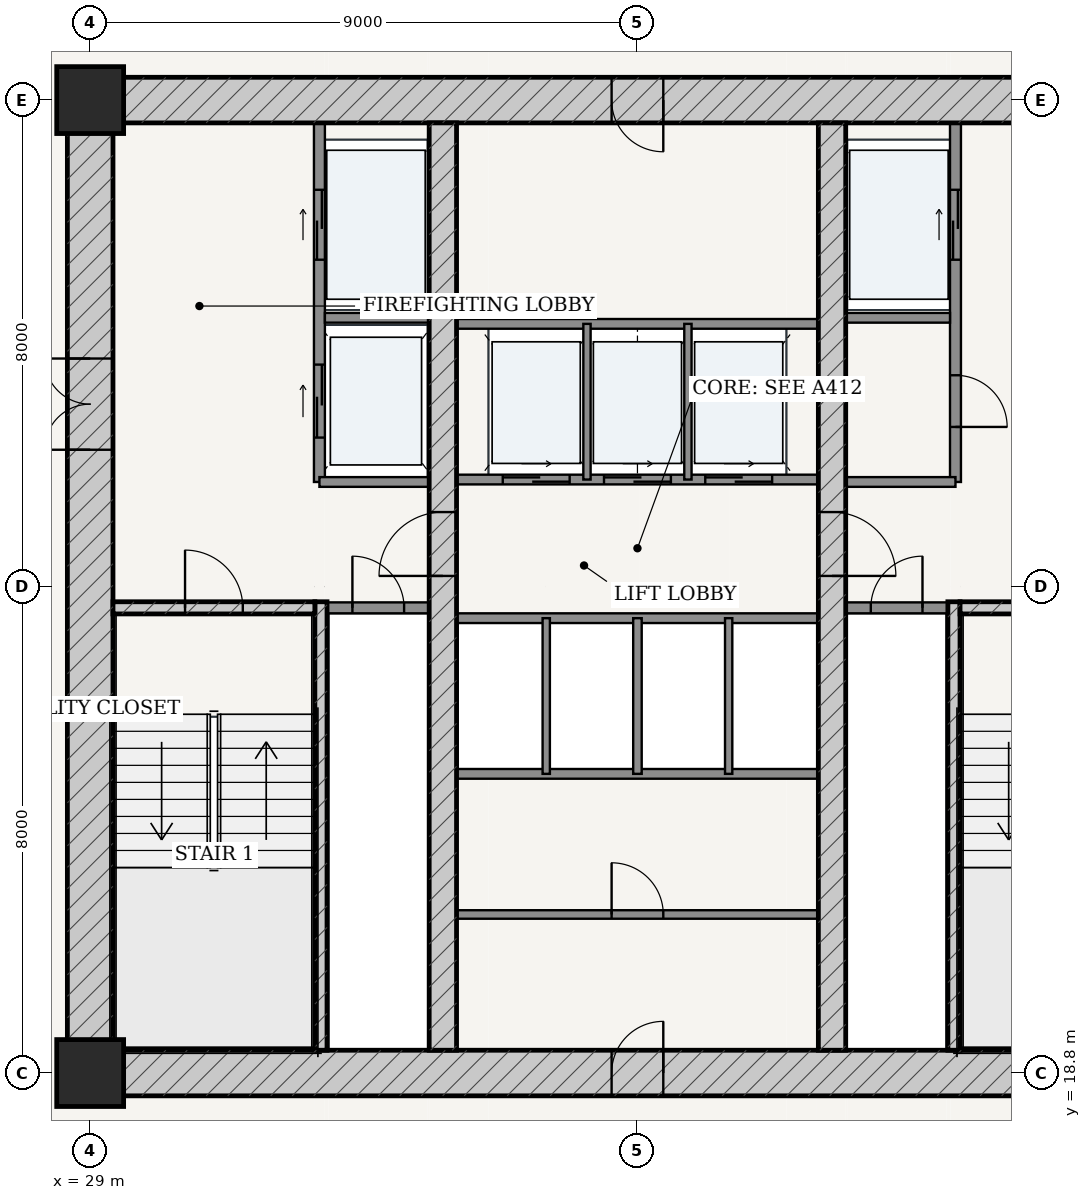
"""IFC4 building model, lengths in metres.
Left out: names, types, materials, properties, quantities, classifications, styles, units other than length and angle.
Written with IfcOpenShell. Run it as: python <this file> out.ifc"""

import sys

from ifc_helpers import new_model, si_unit, direction, frame, frame_2d, origin, origin_2d, place, context, subcontext, project, spatial, rectangle, extrude, source, transform, mapped, element, fill, save


model = new_model("IFC4")
c1 = context("Model", 3, precision=1e-05, world=origin(), true_north=direction((-0.2419218956, 0.970295726276)))
c2 = subcontext(c1, "Body", "Model", "MODEL_VIEW")
j1 = project(units=[si_unit("LENGTHUNIT", "METRE"), si_unit("PLANEANGLEUNIT", "RADIAN")], contexts=[c1])
p1 = place(None, origin())
s1 = spatial("IfcSite", under=j1, at=p1, CompositionType="ELEMENT")
p2 = place(p1, origin())
s2 = spatial("IfcBuilding", under=s1, at=p2, CompositionType="ELEMENT")
p3 = place(p2, frame((0.0, 0.0, 63.6)))
s3 = spatial("IfcBuildingStorey", under=s2, at=p3, CompositionType="ELEMENT", Elevation=63.6)
for number, where, z_axis, x_axis in (
    (1, (29.0, 18.8, 0.0), (0.0, 0.0, 1.0), (1.0, 0.0, 0.0)),
    (2, (29.0, 34.8, 0.0), (0.0, 0.0, 1.0), (1.0, 0.0, 0.0)),
):
    element("IfcColumn", number, at=place(p3, frame(where, z_axis=z_axis, x_axis=x_axis)), inside=s3, PredefinedType="COLUMN", context=c2, shape_type="SweptSolid", body=[
        extrude(rectangle(XDim=1.1, YDim=1.1, at=origin_2d()), origin(), (0.0, 0.0, 1.0), 3.6),
    ])
p4 = place(p3, frame((28.625, 18.8, 0.0), z_axis=(0.0, 0.0, 1.0), x_axis=(1.0, 0.0, 0.0)))
e3 = element("IfcWall", 3, at=p4, inside=s3, PredefinedType="SHEAR", context=c2, shape_type="SweptSolid", body=[
    extrude(rectangle(XDim=18.75, YDim=0.75, at=frame_2d((9.375, 0.0))), origin(), (0.0, 0.0, 1.0), 3.32),
])
p5 = place(p4, frame((8.95, 0.0, 0.0)))
e4 = element("IfcOpeningElement", 4, at=p5, cuts=e3, PredefinedType="OPENING", context=c2, shape_type="SweptSolid", body=[
    extrude(rectangle(XDim=0.85, YDim=2.1, at=frame_2d((0.425, 1.05))), frame((0.0, 0.385, 0.0), z_axis=(0.0, -1.0, 0.0), x_axis=(1.0, 0.0, 0.0)), (0.0, 0.0, 1.0), 0.77),
])
p6 = place(p3, frame((28.625, 34.8, 0.0), z_axis=(0.0, 0.0, 1.0), x_axis=(1.0, 0.0, 0.0)))
e5 = element("IfcWall", 5, at=p6, inside=s3, PredefinedType="SHEAR", context=c2, shape_type="SweptSolid", body=[
    extrude(rectangle(XDim=18.75, YDim=0.75, at=frame_2d((9.375, 0.0))), origin(), (0.0, 0.0, 1.0), 3.32),
])
p7 = place(p6, frame((8.95, 0.0, 0.0)))
e6 = element("IfcOpeningElement", 6, at=p7, cuts=e5, PredefinedType="OPENING", context=c2, shape_type="SweptSolid", body=[
    extrude(rectangle(XDim=0.85, YDim=2.1, at=frame_2d((0.425, 1.05))), frame((0.0, 0.385, 0.0), z_axis=(0.0, -1.0, 0.0), x_axis=(1.0, 0.0, 0.0)), (0.0, 0.0, 1.0), 0.77),
])
p8 = place(p3, frame((29.0, 19.175, 0.0), z_axis=(0.0, 0.0, 1.0), x_axis=(0.0, 1.0, 0.0)))
e7 = element("IfcWall", 7, at=p8, inside=s3, PredefinedType="SHEAR", context=c2, shape_type="SweptSolid", body=[
    extrude(rectangle(XDim=15.25, YDim=0.75, at=frame_2d((7.625, 0.0))), origin(), (0.0, 0.0, 1.0), 3.32),
])
p9 = place(p8, frame((9.875, 0.0, 0.0)))
e8 = element("IfcOpeningElement", 8, at=p9, cuts=e7, PredefinedType="OPENING", context=c2, shape_type="SweptSolid", body=[
    extrude(rectangle(XDim=1.5, YDim=2.2, at=frame_2d((0.75, 1.1))), frame((0.0, 0.385, 0.0), z_axis=(0.0, -1.0, 0.0), x_axis=(1.0, 0.0, 0.0)), (0.0, 0.0, 1.0), 0.77),
])
p10 = place(p3, frame((32.795, 19.175, 0.0), z_axis=(0.0, 0.0, 1.0), x_axis=(0.0, 1.0, 0.0)))
e9 = element("IfcWall", 9, at=p10, inside=s3, PredefinedType="SOLIDWALL", context=c2, shape_type="SweptSolid", body=[
    extrude(rectangle(XDim=7.375, YDim=0.2, at=frame_2d((3.688, 0.0))), origin(), (0.0, 0.0, 1.0), 3.32),
])
p11 = place(p3, frame((29.375, 26.45, 0.0), z_axis=(0.0, 0.0, 1.0), x_axis=(1.0, 0.0, 0.0)))
e10 = element("IfcWall", 10, at=p11, inside=s3, PredefinedType="SOLIDWALL", context=c2, shape_type="SweptSolid", body=[
    extrude(rectangle(XDim=3.32, YDim=0.2, at=frame_2d((1.66, 0.0))), origin(), (0.0, 0.0, 1.0), 3.32),
])
p12 = place(p11, frame((1.185, 0.0, 0.0)))
e11 = element("IfcOpeningElement", 11, at=p12, cuts=e10, PredefinedType="OPENING", context=c2, shape_type="SweptSolid", body=[
    extrude(rectangle(XDim=0.95, YDim=2.15, at=frame_2d((0.475, 1.075))), frame((0.0, 0.11, 0.0), z_axis=(0.0, -1.0, 0.0), x_axis=(1.0, 0.0, 0.0)), (0.0, 0.0, 1.0), 0.22),
])
p13 = place(p3, frame((43.205, 19.175, 0.0), z_axis=(0.0, 0.0, 1.0), x_axis=(0.0, 1.0, 0.0)))
e12 = element("IfcWall", 12, at=p13, inside=s3, PredefinedType="SOLIDWALL", context=c2, shape_type="SweptSolid", body=[
    extrude(rectangle(XDim=7.375, YDim=0.2, at=frame_2d((3.688, 0.0))), origin(), (0.0, 0.0, 1.0), 3.32),
])
p14 = place(p3, frame((43.305, 26.45, 0.0), z_axis=(0.0, 0.0, 1.0), x_axis=(1.0, 0.0, 0.0)))
e13 = element("IfcWall", 13, at=p14, inside=s3, PredefinedType="SOLIDWALL", context=c2, shape_type="SweptSolid", body=[
    extrude(rectangle(XDim=3.32, YDim=0.2, at=frame_2d((1.66, 0.0))), origin(), (0.0, 0.0, 1.0), 3.32),
])
p15 = place(p14, frame((1.185, 0.0, 0.0)))
e14 = element("IfcOpeningElement", 14, at=p15, cuts=e13, PredefinedType="OPENING", context=c2, shape_type="SweptSolid", body=[
    extrude(rectangle(XDim=0.95, YDim=2.15, at=frame_2d((0.475, 1.075))), frame((0.0, 0.11, 0.0), z_axis=(0.0, -1.0, 0.0), x_axis=(1.0, 0.0, 0.0)), (0.0, 0.0, 1.0), 0.22),
])
p16 = place(p3, frame((34.8, 19.175, 0.0), z_axis=(0.0, 0.0, 1.0), x_axis=(0.0, 1.0, 0.0)))
e15 = element("IfcWall", 15, at=p16, inside=s3, PredefinedType="SHEAR", context=c2, shape_type="SweptSolid", body=[
    extrude(rectangle(XDim=15.25, YDim=0.45, at=frame_2d((7.625, 0.0))), origin(), (0.0, 0.0, 1.0), 3.32),
])
p17 = place(p16, frame((7.8, 0.0, 0.0)))
e16 = element("IfcOpeningElement", 16, at=p17, cuts=e15, PredefinedType="OPENING", context=c2, shape_type="SweptSolid", body=[
    extrude(rectangle(XDim=1.05, YDim=2.15, at=frame_2d((0.525, 1.075))), frame((0.0, 0.235, 0.0), z_axis=(0.0, -1.0, 0.0), x_axis=(1.0, 0.0, 0.0)), (0.0, 0.0, 1.0), 0.47),
])
p18 = place(p3, frame((41.2, 19.175, 0.0), z_axis=(0.0, 0.0, 1.0), x_axis=(0.0, 1.0, 0.0)))
e17 = element("IfcWall", 17, at=p18, inside=s3, PredefinedType="SHEAR", context=c2, shape_type="SweptSolid", body=[
    extrude(rectangle(XDim=15.25, YDim=0.45, at=frame_2d((7.625, 0.0))), origin(), (0.0, 0.0, 1.0), 3.32),
])
p19 = place(p18, frame((7.8, 0.0, 0.0)))
e18 = element("IfcOpeningElement", 18, at=p19, cuts=e17, PredefinedType="OPENING", context=c2, shape_type="SweptSolid", body=[
    extrude(rectangle(XDim=1.05, YDim=2.15, at=frame_2d((0.525, 1.075))), frame((0.0, 0.235, 0.0), z_axis=(0.0, -1.0, 0.0), x_axis=(1.0, 0.0, 0.0)), (0.0, 0.0, 1.0), 0.47),
])
p20 = place(p3, frame((32.9, 26.45, 0.0), z_axis=(0.0, 0.0, 1.0), x_axis=(1.0, 0.0, 0.0)))
e19 = element("IfcWall", 19, at=p20, inside=s3, PredefinedType="PARTITIONING", context=c2, shape_type="SweptSolid", body=[
    extrude(rectangle(XDim=1.675, YDim=0.18, at=frame_2d((0.837, 0.0))), origin(), (0.0, 0.0, 1.0), 3.32),
])
p21 = place(p20, frame((0.413, 0.0, 0.0)))
e20 = element("IfcOpeningElement", 20, at=p21, cuts=e19, PredefinedType="OPENING", context=c2, shape_type="SweptSolid", body=[
    extrude(rectangle(XDim=0.85, YDim=2.1, at=frame_2d((0.425, 1.05))), frame((0.0, 0.1, 0.0), z_axis=(0.0, -1.0, 0.0), x_axis=(1.0, 0.0, 0.0)), (0.0, 0.0, 1.0), 0.2),
])
p22 = place(p3, frame((41.425, 26.45, 0.0), z_axis=(0.0, 0.0, 1.0), x_axis=(1.0, 0.0, 0.0)))
e21 = element("IfcWall", 21, at=p22, inside=s3, PredefinedType="PARTITIONING", context=c2, shape_type="SweptSolid", body=[
    extrude(rectangle(XDim=1.675, YDim=0.18, at=frame_2d((0.837, 0.0))), origin(), (0.0, 0.0, 1.0), 3.32),
])
p23 = place(p22, frame((0.413, 0.0, 0.0)))
e22 = element("IfcOpeningElement", 22, at=p23, cuts=e21, PredefinedType="OPENING", context=c2, shape_type="SweptSolid", body=[
    extrude(rectangle(XDim=0.85, YDim=2.1, at=frame_2d((0.425, 1.05))), frame((0.0, 0.1, 0.0), z_axis=(0.0, -1.0, 0.0), x_axis=(1.0, 0.0, 0.0)), (0.0, 0.0, 1.0), 0.2),
])
p24 = place(p3, frame((32.77, 28.52, 0.0), z_axis=(0.0, 0.0, 1.0), x_axis=(0.0, 1.0, 0.0)))
e23 = element("IfcWall", 23, at=p24, inside=s3, PredefinedType="PARTITIONING", context=c2, shape_type="SweptSolid", body=[
    extrude(rectangle(XDim=5.905, YDim=0.18, at=frame_2d((2.953, 0.0))), origin(), (0.0, 0.0, 1.0), 3.32),
])
p25 = place(p24, frame((3.655, 0.0, 0.0)))
e24 = element("IfcOpeningElement", 24, at=p25, cuts=e23, PredefinedType="OPENING", context=c2, shape_type="SweptSolid", body=[
    extrude(rectangle(XDim=1.15, YDim=2.2, at=frame_2d((0.575, 1.1))), frame((0.0, 0.1, 0.0), z_axis=(0.0, -1.0, 0.0), x_axis=(1.0, 0.0, 0.0)), (0.0, 0.0, 1.0), 0.2),
])
p26 = place(p24, frame((0.73, 0.0, 0.0)))
e25 = element("IfcOpeningElement", 25, at=p26, cuts=e23, PredefinedType="OPENING", context=c2, shape_type="SweptSolid", body=[
    extrude(rectangle(XDim=1.2, YDim=2.25, at=frame_2d((0.6, 1.125))), frame((0.0, 0.1, 0.0), z_axis=(0.0, -1.0, 0.0), x_axis=(1.0, 0.0, 0.0)), (0.0, 0.0, 1.0), 0.2),
])
p27 = place(p3, frame((32.86, 31.22, 0.0), z_axis=(0.0, 0.0, 1.0), x_axis=(1.0, 0.0, 0.0)))
e26 = element("IfcWall", 26, at=p27, inside=s3, PredefinedType="PARTITIONING", context=c2, shape_type="SweptSolid", body=[
    extrude(rectangle(XDim=1.715, YDim=0.16, at=frame_2d((0.857, 0.0))), origin(), (0.0, 0.0, 1.0), 3.32),
])
p28 = place(p3, frame((32.77, 28.52, 0.0), z_axis=(0.0, 0.0, 1.0), x_axis=(1.0, 0.0, 0.0)))
e27 = element("IfcWall", 27, at=p28, inside=s3, PredefinedType="PARTITIONING", context=c2, shape_type="SweptSolid", body=[
    extrude(rectangle(XDim=1.805, YDim=0.16, at=frame_2d((0.902, 0.0))), origin(), (0.0, 0.0, 1.0), 3.32),
])
p29 = place(p3, frame((43.23, 28.52, 0.0), z_axis=(0.0, 0.0, 1.0), x_axis=(0.0, 1.0, 0.0)))
e28 = element("IfcWall", 28, at=p29, inside=s3, PredefinedType="PARTITIONING", context=c2, shape_type="SweptSolid", body=[
    extrude(rectangle(XDim=5.905, YDim=0.18, at=frame_2d((2.953, 0.0))), origin(), (0.0, 0.0, 1.0), 3.32),
])
p30 = place(p29, frame((0.905, 0.0, 0.0)))
e29 = element("IfcOpeningElement", 29, at=p30, cuts=e28, PredefinedType="OPENING", context=c2, shape_type="SweptSolid", body=[
    extrude(rectangle(XDim=0.85, YDim=2.1, at=frame_2d((0.425, 1.05))), frame((0.0, 0.1, 0.0), z_axis=(0.0, -1.0, 0.0), x_axis=(1.0, 0.0, 0.0)), (0.0, 0.0, 1.0), 0.2),
])
p31 = place(p29, frame((3.655, 0.0, 0.0)))
e30 = element("IfcOpeningElement", 30, at=p31, cuts=e28, PredefinedType="OPENING", context=c2, shape_type="SweptSolid", body=[
    extrude(rectangle(XDim=1.15, YDim=2.2, at=frame_2d((0.575, 1.1))), frame((0.0, 0.1, 0.0), z_axis=(0.0, -1.0, 0.0), x_axis=(1.0, 0.0, 0.0)), (0.0, 0.0, 1.0), 0.2),
])
p32 = place(p3, frame((41.425, 31.22, 0.0), z_axis=(0.0, 0.0, 1.0), x_axis=(1.0, 0.0, 0.0)))
e31 = element("IfcWall", 31, at=p32, inside=s3, PredefinedType="PARTITIONING", context=c2, shape_type="SweptSolid", body=[
    extrude(rectangle(XDim=1.715, YDim=0.16, at=frame_2d((0.857, 0.0))), origin(), (0.0, 0.0, 1.0), 3.32),
])
p33 = place(p3, frame((41.425, 28.52, 0.0), z_axis=(0.0, 0.0, 1.0), x_axis=(1.0, 0.0, 0.0)))
e32 = element("IfcWall", 32, at=p33, inside=s3, PredefinedType="PARTITIONING", context=c2, shape_type="SweptSolid", body=[
    extrude(rectangle(XDim=1.805, YDim=0.16, at=frame_2d((0.902, 0.0))), origin(), (0.0, 0.0, 1.0), 3.32),
])
p34 = place(p3, frame((35.025, 28.56, 0.0), z_axis=(0.0, 0.0, 1.0), x_axis=(1.0, 0.0, 0.0)))
e33 = element("IfcWall", 33, at=p34, inside=s3, PredefinedType="PARTITIONING", context=c2, shape_type="SweptSolid", body=[
    extrude(rectangle(XDim=5.95, YDim=0.16, at=frame_2d((2.975, 0.0))), origin(), (0.0, 0.0, 1.0), 3.32),
])
p35 = place(p34, frame((0.76, 0.0, 0.0)))
e34 = element("IfcOpeningElement", 34, at=p35, cuts=e33, PredefinedType="OPENING", context=c2, shape_type="SweptSolid", body=[
    extrude(rectangle(XDim=1.1, YDim=2.2, at=frame_2d((0.55, 1.1))), frame((0.0, 0.09, 0.0), z_axis=(0.0, -1.0, 0.0), x_axis=(1.0, 0.0, 0.0)), (0.0, 0.0, 1.0), 0.18),
])
p36 = place(p34, frame((2.425, 0.0, 0.0)))
e35 = element("IfcOpeningElement", 35, at=p36, cuts=e33, PredefinedType="OPENING", context=c2, shape_type="SweptSolid", body=[
    extrude(rectangle(XDim=1.1, YDim=2.2, at=frame_2d((0.55, 1.1))), frame((0.0, 0.09, 0.0), z_axis=(0.0, -1.0, 0.0), x_axis=(1.0, 0.0, 0.0)), (0.0, 0.0, 1.0), 0.18),
])
p37 = place(p34, frame((4.09, 0.0, 0.0)))
e36 = element("IfcOpeningElement", 36, at=p37, cuts=e33, PredefinedType="OPENING", context=c2, shape_type="SweptSolid", body=[
    extrude(rectangle(XDim=1.1, YDim=2.2, at=frame_2d((0.55, 1.1))), frame((0.0, 0.09, 0.0), z_axis=(0.0, -1.0, 0.0), x_axis=(1.0, 0.0, 0.0)), (0.0, 0.0, 1.0), 0.18),
])
p38 = place(p3, frame((35.025, 31.12, 0.0), z_axis=(0.0, 0.0, 1.0), x_axis=(1.0, 0.0, 0.0)))
e37 = element("IfcWall", 37, at=p38, inside=s3, PredefinedType="PARTITIONING", context=c2, shape_type="SweptSolid", body=[
    extrude(rectangle(XDim=5.95, YDim=0.16, at=frame_2d((2.975, 0.0))), origin(), (0.0, 0.0, 1.0), 3.32),
])
for number, where, z_axis, x_axis in (
    (38, (37.17, 28.56, 0.0), (0.0, 0.0, 1.0), (0.0, 1.0, 0.0)),
    (39, (38.83, 28.56, 0.0), (0.0, 0.0, 1.0), (0.0, 1.0, 0.0)),
):
    element("IfcWall", number, at=place(p3, frame(where, z_axis=z_axis, x_axis=x_axis)), inside=s3, PredefinedType="PARTITIONING", context=c2, shape_type="SweptSolid", body=[
        extrude(rectangle(XDim=2.56, YDim=0.12, at=frame_2d((1.28, 0.0))), origin(), (0.0, 0.0, 1.0), 3.32),
    ])
for number, where, z_axis, x_axis in (
    (40, (35.025, 26.28, 0.0), (0.0, 0.0, 1.0), (1.0, 0.0, 0.0)),
    (41, (35.025, 23.72, 0.0), (0.0, 0.0, 1.0), (1.0, 0.0, 0.0)),
):
    element("IfcWall", number, at=place(p3, frame(where, z_axis=z_axis, x_axis=x_axis)), inside=s3, PredefinedType="PARTITIONING", context=c2, shape_type="SweptSolid", body=[
        extrude(rectangle(XDim=5.95, YDim=0.16, at=frame_2d((2.975, 0.0))), origin(), (0.0, 0.0, 1.0), 3.32),
    ])
p39 = place(p3, frame((36.5, 23.72, 0.0), z_axis=(0.0, 0.0, 1.0), x_axis=(0.0, 1.0, 0.0)))
e42 = element("IfcWall", 42, at=p39, inside=s3, PredefinedType="PARTITIONING", context=c2, shape_type="SweptSolid", body=[
    extrude(rectangle(XDim=2.56, YDim=0.12, at=frame_2d((1.28, 0.0))), origin(), (0.0, 0.0, 1.0), 3.32),
])
p40 = place(p3, frame((38.0, 23.72, 0.0), z_axis=(0.0, 0.0, 1.0), x_axis=(0.0, 1.0, 0.0)))
e43 = element("IfcWall", 43, at=p40, inside=s3, PredefinedType="PARTITIONING", context=c2, shape_type="SweptSolid", body=[
    extrude(rectangle(XDim=2.56, YDim=0.14, at=frame_2d((1.28, 0.0))), origin(), (0.0, 0.0, 1.0), 3.32),
])
p41 = place(p3, frame((39.5, 23.72, 0.0), z_axis=(0.0, 0.0, 1.0), x_axis=(0.0, 1.0, 0.0)))
e44 = element("IfcWall", 44, at=p41, inside=s3, PredefinedType="PARTITIONING", context=c2, shape_type="SweptSolid", body=[
    extrude(rectangle(XDim=2.56, YDim=0.12, at=frame_2d((1.28, 0.0))), origin(), (0.0, 0.0, 1.0), 3.32),
])
p42 = place(p3, frame((35.025, 21.407, 0.0), z_axis=(0.0, 0.0, 1.0), x_axis=(1.0, 0.0, 0.0)))
e45 = element("IfcWall", 45, at=p42, inside=s3, PredefinedType="PARTITIONING", context=c2, shape_type="SweptSolid", body=[
    extrude(rectangle(XDim=5.95, YDim=0.14, at=frame_2d((2.975, 0.0))), origin(), (0.0, 0.0, 1.0), 3.32),
])
p43 = place(p42, frame((2.55, 0.0, 0.0)))
e46 = element("IfcOpeningElement", 46, at=p43, cuts=e45, PredefinedType="OPENING", context=c2, shape_type="SweptSolid", body=[
    extrude(rectangle(XDim=0.85, YDim=2.1, at=frame_2d((0.425, 1.05))), frame((0.0, 0.08, 0.0), z_axis=(0.0, -1.0, 0.0), x_axis=(1.0, 0.0, 0.0)), (0.0, 0.0, 1.0), 0.16),
])
m1 = source(origin(), c2, "Body", "SweptSolid", [
    extrude(rectangle(XDim=1.5, YDim=2.2, at=frame_2d((0.75, 1.1))), frame((0.0, 0.025, 0.0), z_axis=(0.0, -1.0, 0.0), x_axis=(1.0, 0.0, 0.0)), (0.0, 0.0, 1.0), 0.05),
])
p44 = place(p9, origin())
e47 = element("IfcDoor", 47, at=p44, inside=s3, OperationType="DOUBLE_DOOR_SINGLE_SWING", PredefinedType="DOOR", context=c2, shape_type="MappedRepresentation", body=[
    mapped(m1, transform((0.0, 0.0, 0.0), scale=1.0)),
])
fill(e8, e47)
m2 = source(origin(), c2, "Body", "SweptSolid", [
    extrude(rectangle(XDim=1.05, YDim=2.15, at=frame_2d((0.525, 1.075))), frame((0.0, 0.025, 0.0), z_axis=(0.0, -1.0, 0.0), x_axis=(1.0, 0.0, 0.0)), (0.0, 0.0, 1.0), 0.05),
])
p45 = place(p17, origin())
e48 = element("IfcDoor", 48, at=p45, inside=s3, OperationType="SINGLE_SWING_LEFT", PredefinedType="DOOR", context=c2, shape_type="MappedRepresentation", body=[
    mapped(m2, transform((0.0, 0.0, 0.0), scale=1.0)),
])
fill(e16, e48)
p46 = place(p19, frame((1.05, 0.0, 0.0), z_axis=(0.0, 0.0, 1.0), x_axis=(-1.0, 0.0, 0.0)))
e49 = element("IfcDoor", 49, at=p46, inside=s3, OperationType="SINGLE_SWING_RIGHT", PredefinedType="DOOR", context=c2, shape_type="MappedRepresentation", body=[
    mapped(m2, transform((0.0, 0.0, 0.0), scale=1.0)),
])
fill(e18, e49)
m3 = source(origin(), c2, "Body", "SweptSolid", [
    extrude(rectangle(XDim=0.95, YDim=2.15, at=frame_2d((0.475, 1.075))), frame((0.0, 0.025, 0.0), z_axis=(0.0, -1.0, 0.0), x_axis=(1.0, 0.0, 0.0)), (0.0, 0.0, 1.0), 0.05),
])
p47 = place(p12, origin())
e50 = element("IfcDoor", 50, at=p47, inside=s3, OperationType="SINGLE_SWING_LEFT", PredefinedType="DOOR", context=c2, shape_type="MappedRepresentation", body=[
    mapped(m3, transform((0.0, 0.0, 0.0), scale=1.0)),
])
fill(e11, e50)
m4 = source(origin(), c2, "Body", "SweptSolid", [
    extrude(rectangle(XDim=0.85, YDim=2.1, at=frame_2d((0.425, 1.05))), frame((0.0, 0.025, 0.0), z_axis=(0.0, -1.0, 0.0), x_axis=(1.0, 0.0, 0.0)), (0.0, 0.0, 1.0), 0.05),
])
p48 = place(p21, origin())
e51 = element("IfcDoor", 51, at=p48, inside=s3, OperationType="SINGLE_SWING_LEFT", PredefinedType="DOOR", context=c2, shape_type="MappedRepresentation", body=[
    mapped(m4, transform((0.0, 0.0, 0.0), scale=1.0)),
])
fill(e20, e51)
p49 = place(p23, origin())
e52 = element("IfcDoor", 52, at=p49, inside=s3, OperationType="SINGLE_SWING_RIGHT", PredefinedType="DOOR", context=c2, shape_type="MappedRepresentation", body=[
    mapped(m4, transform((0.0, 0.0, 0.0), scale=1.0)),
])
fill(e22, e52)
p50 = place(p30, frame((0.85, 0.0, 0.0), z_axis=(0.0, 0.0, 1.0), x_axis=(-1.0, 0.0, 0.0)))
e53 = element("IfcDoor", 53, at=p50, inside=s3, OperationType="SINGLE_SWING_RIGHT", PredefinedType="DOOR", context=c2, shape_type="MappedRepresentation", body=[
    mapped(m4, transform((0.0, 0.0, 0.0), scale=1.0)),
])
fill(e29, e53)
p51 = place(p7, frame((0.85, 0.0, 0.0), z_axis=(0.0, 0.0, 1.0), x_axis=(-1.0, 0.0, 0.0)))
e54 = element("IfcDoor", 54, at=p51, inside=s3, OperationType="SINGLE_SWING_LEFT", PredefinedType="DOOR", context=c2, shape_type="MappedRepresentation", body=[
    mapped(m4, transform((0.0, 0.0, 0.0), scale=1.0)),
])
fill(e6, e54)
p52 = place(p5, origin())
e55 = element("IfcDoor", 55, at=p52, inside=s3, OperationType="SINGLE_SWING_RIGHT", PredefinedType="DOOR", context=c2, shape_type="MappedRepresentation", body=[
    mapped(m4, transform((0.0, 0.0, 0.0), scale=1.0)),
])
fill(e4, e55)
p53 = place(p43, origin())
e56 = element("IfcDoor", 56, at=p53, inside=s3, OperationType="SINGLE_SWING_LEFT", PredefinedType="DOOR", context=c2, shape_type="MappedRepresentation", body=[
    mapped(m4, transform((0.0, 0.0, 0.0), scale=1.0)),
])
fill(e46, e56)
m5 = source(origin(), c2, "Body", "SweptSolid", [
    extrude(rectangle(XDim=1.15, YDim=2.2, at=frame_2d((0.575, 1.1))), frame((0.0, 0.025, 0.0), z_axis=(0.0, -1.0, 0.0), x_axis=(1.0, 0.0, 0.0)), (0.0, 0.0, 1.0), 0.05),
])
p54 = place(p25, origin())
e57 = element("IfcDoor", 57, at=p54, inside=s3, OperationType="DOUBLE_DOOR_SLIDING", PredefinedType="DOOR", context=c2, shape_type="MappedRepresentation", body=[
    mapped(m5, transform((0.0, 0.0, 0.0), scale=1.0)),
])
fill(e24, e57)
p55 = place(p31, origin())
e58 = element("IfcDoor", 58, at=p55, inside=s3, OperationType="DOUBLE_DOOR_SLIDING", PredefinedType="DOOR", context=c2, shape_type="MappedRepresentation", body=[
    mapped(m5, transform((0.0, 0.0, 0.0), scale=1.0)),
])
fill(e30, e58)
m6 = source(origin(), c2, "Body", "SweptSolid", [
    extrude(rectangle(XDim=1.2, YDim=2.25, at=frame_2d((0.6, 1.125))), frame((0.0, 0.025, 0.0), z_axis=(0.0, -1.0, 0.0), x_axis=(1.0, 0.0, 0.0)), (0.0, 0.0, 1.0), 0.05),
])
p56 = place(p26, origin())
e59 = element("IfcDoor", 59, at=p56, inside=s3, OperationType="DOUBLE_DOOR_SLIDING", PredefinedType="DOOR", context=c2, shape_type="MappedRepresentation", body=[
    mapped(m6, transform((0.0, 0.0, 0.0), scale=1.0)),
])
fill(e25, e59)
m7 = source(origin(), c2, "Body", "SweptSolid", [
    extrude(rectangle(XDim=1.1, YDim=2.2, at=frame_2d((0.55, 1.1))), frame((0.0, 0.025, 0.0), z_axis=(0.0, -1.0, 0.0), x_axis=(1.0, 0.0, 0.0)), (0.0, 0.0, 1.0), 0.05),
])
p57 = place(p35, origin())
e60 = element("IfcDoor", 60, at=p57, inside=s3, OperationType="DOUBLE_DOOR_SLIDING", PredefinedType="DOOR", context=c2, shape_type="MappedRepresentation", body=[
    mapped(m7, transform((0.0, 0.0, 0.0), scale=1.0)),
])
fill(e34, e60)
p58 = place(p36, origin())
e61 = element("IfcDoor", 61, at=p58, inside=s3, OperationType="DOUBLE_DOOR_SLIDING", PredefinedType="DOOR", context=c2, shape_type="MappedRepresentation", body=[
    mapped(m7, transform((0.0, 0.0, 0.0), scale=1.0)),
])
fill(e35, e61)
p59 = place(p37, origin())
e62 = element("IfcDoor", 62, at=p59, inside=s3, OperationType="DOUBLE_DOOR_SLIDING", PredefinedType="DOOR", context=c2, shape_type="MappedRepresentation", body=[
    mapped(m7, transform((0.0, 0.0, 0.0), scale=1.0)),
])
fill(e36, e62)
save(model, sys.argv[1])
